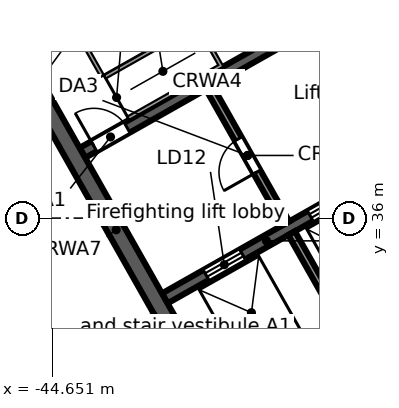
"""IFC4 building model, lengths in metres.
Left out: names, types, materials, properties, quantities, classifications, styles, units other than length and angle.
Written with IfcOpenShell. Run it as: python <this file> out.ifc"""

import sys

from ifc_helpers import new_model, si_unit, direction, frame, frame_2d, origin, place, context, subcontext, project, spatial, rectangle, extrude, element, fill, save


model = new_model("IFC4")
c1 = context("Model", 3, precision=1e-05, world=origin(), true_north=direction((0.0, 1.0)))
c2 = subcontext(c1, "Body", "Model", "MODEL_VIEW")
j1 = project(units=[si_unit("LENGTHUNIT", "METRE"), si_unit("PLANEANGLEUNIT", "RADIAN")], contexts=[c1])
p1 = place(None, origin())
s1 = spatial("IfcSite", under=j1, at=p1, CompositionType="ELEMENT")
p2 = place(p1, origin())
s2 = spatial("IfcBuilding", under=s1, at=p2, CompositionType="ELEMENT")
p3 = place(p2, frame((0.0, 0.0, 219.2)))
s3 = spatial("IfcBuildingStorey", under=s2, at=p3, CompositionType="ELEMENT", Elevation=219.2)
p4 = place(p3, frame((-0.046, 47.974, 0.0), z_axis=(0.0, 0.0, 1.0), x_axis=(-0.870356579543, -0.492421998337, 0.0)))
e1 = element("IfcWall", 1, at=p4, inside=s3, PredefinedType="STANDARD", context=c2, shape_type="SweptSolid", body=[
    extrude(rectangle(XDim=43.754, YDim=0.25, at=frame_2d((21.877, 0.0))), origin(), (0.0, 0.0, 1.0), 3.62),
])
p5 = place(p4, frame((41.061, 0.0, 0.8)))
e2 = element("IfcOpeningElement", 2, at=p5, cuts=e1, PredefinedType="OPENING", context=c2, shape_type="SweptSolid", body=[
    extrude(rectangle(XDim=2.4, YDim=2.2, at=frame_2d((1.2, 1.1))), frame((0.0, 0.135, 0.0), z_axis=(0.0, -1.0, 0.0), x_axis=(1.0, 0.0, 0.0)), (0.0, 0.0, 1.0), 0.27),
])
p6 = place(p4, frame((38.443, 0.0, 0.0)))
e3 = element("IfcOpeningElement", 3, at=p6, cuts=e1, PredefinedType="OPENING", context=c2, shape_type="SweptSolid", body=[
    extrude(rectangle(XDim=1.8, YDim=2.4, at=frame_2d((0.9, 1.2))), frame((0.0, 0.135, 0.0), z_axis=(0.0, -1.0, 0.0), x_axis=(1.0, 0.0, 0.0)), (0.0, 0.0, 1.0), 0.27),
])
p7 = place(p4, frame((35.225, 0.0, 0.8)))
e4 = element("IfcOpeningElement", 4, at=p7, cuts=e1, PredefinedType="OPENING", context=c2, shape_type="SweptSolid", body=[
    extrude(rectangle(XDim=2.4, YDim=2.2, at=frame_2d((1.2, 1.1))), frame((0.0, 0.135, 0.0), z_axis=(0.0, -1.0, 0.0), x_axis=(1.0, 0.0, 0.0)), (0.0, 0.0, 1.0), 0.27),
])
p8 = place(p4, frame((32.307, 0.0, 0.8)))
e5 = element("IfcOpeningElement", 5, at=p8, cuts=e1, PredefinedType="OPENING", context=c2, shape_type="SweptSolid", body=[
    extrude(rectangle(XDim=2.4, YDim=2.2, at=frame_2d((1.2, 1.1))), frame((0.0, 0.135, 0.0), z_axis=(0.0, -1.0, 0.0), x_axis=(1.0, 0.0, 0.0)), (0.0, 0.0, 1.0), 0.27),
])
p9 = place(p4, frame((29.688, 0.0, 0.0)))
e6 = element("IfcOpeningElement", 6, at=p9, cuts=e1, PredefinedType="OPENING", context=c2, shape_type="SweptSolid", body=[
    extrude(rectangle(XDim=1.8, YDim=2.4, at=frame_2d((0.9, 1.2))), frame((0.0, 0.135, 0.0), z_axis=(0.0, -1.0, 0.0), x_axis=(1.0, 0.0, 0.0)), (0.0, 0.0, 1.0), 0.27),
])
p10 = place(p4, frame((26.47, 0.0, 0.8)))
e7 = element("IfcOpeningElement", 7, at=p10, cuts=e1, PredefinedType="OPENING", context=c2, shape_type="SweptSolid", body=[
    extrude(rectangle(XDim=2.4, YDim=2.2, at=frame_2d((1.2, 1.1))), frame((0.0, 0.135, 0.0), z_axis=(0.0, -1.0, 0.0), x_axis=(1.0, 0.0, 0.0)), (0.0, 0.0, 1.0), 0.27),
])
p11 = place(p4, frame((23.552, 0.0, 0.8)))
e8 = element("IfcOpeningElement", 8, at=p11, cuts=e1, PredefinedType="OPENING", context=c2, shape_type="SweptSolid", body=[
    extrude(rectangle(XDim=2.4, YDim=2.2, at=frame_2d((1.2, 1.1))), frame((0.0, 0.135, 0.0), z_axis=(0.0, -1.0, 0.0), x_axis=(1.0, 0.0, 0.0)), (0.0, 0.0, 1.0), 0.27),
])
p12 = place(p4, frame((20.934, 0.0, 0.0)))
e9 = element("IfcOpeningElement", 9, at=p12, cuts=e1, PredefinedType="OPENING", context=c2, shape_type="SweptSolid", body=[
    extrude(rectangle(XDim=1.8, YDim=2.4, at=frame_2d((0.9, 1.2))), frame((0.0, 0.135, 0.0), z_axis=(0.0, -1.0, 0.0), x_axis=(1.0, 0.0, 0.0)), (0.0, 0.0, 1.0), 0.27),
])
p13 = place(p4, frame((17.716, 0.0, 0.8)))
e10 = element("IfcOpeningElement", 10, at=p13, cuts=e1, PredefinedType="OPENING", context=c2, shape_type="SweptSolid", body=[
    extrude(rectangle(XDim=2.4, YDim=2.2, at=frame_2d((1.2, 1.1))), frame((0.0, 0.135, 0.0), z_axis=(0.0, -1.0, 0.0), x_axis=(1.0, 0.0, 0.0)), (0.0, 0.0, 1.0), 0.27),
])
p14 = place(p4, frame((14.798, 0.0, 0.8)))
e11 = element("IfcOpeningElement", 11, at=p14, cuts=e1, PredefinedType="OPENING", context=c2, shape_type="SweptSolid", body=[
    extrude(rectangle(XDim=2.4, YDim=2.2, at=frame_2d((1.2, 1.1))), frame((0.0, 0.135, 0.0), z_axis=(0.0, -1.0, 0.0), x_axis=(1.0, 0.0, 0.0)), (0.0, 0.0, 1.0), 0.27),
])
p15 = place(p4, frame((12.179, 0.0, 0.0)))
e12 = element("IfcOpeningElement", 12, at=p15, cuts=e1, PredefinedType="OPENING", context=c2, shape_type="SweptSolid", body=[
    extrude(rectangle(XDim=1.8, YDim=2.4, at=frame_2d((0.9, 1.2))), frame((0.0, 0.135, 0.0), z_axis=(0.0, -1.0, 0.0), x_axis=(1.0, 0.0, 0.0)), (0.0, 0.0, 1.0), 0.27),
])
p16 = place(p4, frame((8.961, 0.0, 0.8)))
e13 = element("IfcOpeningElement", 13, at=p16, cuts=e1, PredefinedType="OPENING", context=c2, shape_type="SweptSolid", body=[
    extrude(rectangle(XDim=2.4, YDim=2.2, at=frame_2d((1.2, 1.1))), frame((0.0, 0.135, 0.0), z_axis=(0.0, -1.0, 0.0), x_axis=(1.0, 0.0, 0.0)), (0.0, 0.0, 1.0), 0.27),
])
p17 = place(p4, frame((6.043, 0.0, 0.8)))
e14 = element("IfcOpeningElement", 14, at=p17, cuts=e1, PredefinedType="OPENING", context=c2, shape_type="SweptSolid", body=[
    extrude(rectangle(XDim=2.4, YDim=2.2, at=frame_2d((1.2, 1.1))), frame((0.0, 0.135, 0.0), z_axis=(0.0, -1.0, 0.0), x_axis=(1.0, 0.0, 0.0)), (0.0, 0.0, 1.0), 0.27),
])
p18 = place(p4, frame((3.425, 0.0, 0.0)))
e15 = element("IfcOpeningElement", 15, at=p18, cuts=e1, PredefinedType="OPENING", context=c2, shape_type="SweptSolid", body=[
    extrude(rectangle(XDim=1.8, YDim=2.4, at=frame_2d((0.9, 1.2))), frame((0.0, 0.135, 0.0), z_axis=(0.0, -1.0, 0.0), x_axis=(1.0, 0.0, 0.0)), (0.0, 0.0, 1.0), 0.27),
])
p19 = place(p4, frame((0.207, 0.0, 0.8)))
e16 = element("IfcOpeningElement", 16, at=p19, cuts=e1, PredefinedType="OPENING", context=c2, shape_type="SweptSolid", body=[
    extrude(rectangle(XDim=2.4, YDim=2.2, at=frame_2d((1.2, 1.1))), frame((0.0, 0.135, 0.0), z_axis=(0.0, -1.0, 0.0), x_axis=(1.0, 0.0, 0.0)), (0.0, 0.0, 1.0), 0.27),
])
p20 = place(p3, frame((-58.732, 38.771, 0.0), z_axis=(0.0, 0.0, 1.0), x_axis=(0.870354824205, 0.492425100887, 0.0)))
e17 = element("IfcWall", 17, at=p20, inside=s3, PredefinedType="STANDARD", context=c2, shape_type="SweptSolid", body=[
    extrude(rectangle(XDim=64.006, YDim=0.25, at=frame_2d((32.003, 0.0))), origin(), (0.0, 0.0, 1.0), 3.62),
])
p21 = place(p20, frame((61.259, 0.0, 0.8)))
e18 = element("IfcOpeningElement", 18, at=p21, cuts=e17, PredefinedType="OPENING", context=c2, shape_type="SweptSolid", body=[
    extrude(rectangle(XDim=2.4, YDim=2.2, at=frame_2d((1.2, 1.1))), frame((0.0, 0.135, 0.0), z_axis=(0.0, -1.0, 0.0), x_axis=(1.0, 0.0, 0.0)), (0.0, 0.0, 1.0), 0.27),
])
p22 = place(p20, frame((58.216, 0.0, 0.8)))
e19 = element("IfcOpeningElement", 19, at=p22, cuts=e17, PredefinedType="OPENING", context=c2, shape_type="SweptSolid", body=[
    extrude(rectangle(XDim=2.4, YDim=2.2, at=frame_2d((1.2, 1.1))), frame((0.0, 0.135, 0.0), z_axis=(0.0, -1.0, 0.0), x_axis=(1.0, 0.0, 0.0)), (0.0, 0.0, 1.0), 0.27),
])
p23 = place(p20, frame((55.173, 0.0, 0.8)))
e20 = element("IfcOpeningElement", 20, at=p23, cuts=e17, PredefinedType="OPENING", context=c2, shape_type="SweptSolid", body=[
    extrude(rectangle(XDim=2.4, YDim=2.2, at=frame_2d((1.2, 1.1))), frame((0.0, 0.135, 0.0), z_axis=(0.0, -1.0, 0.0), x_axis=(1.0, 0.0, 0.0)), (0.0, 0.0, 1.0), 0.27),
])
p24 = place(p20, frame((52.129, 0.0, 0.8)))
e21 = element("IfcOpeningElement", 21, at=p24, cuts=e17, PredefinedType="OPENING", context=c2, shape_type="SweptSolid", body=[
    extrude(rectangle(XDim=2.4, YDim=2.2, at=frame_2d((1.2, 1.1))), frame((0.0, 0.135, 0.0), z_axis=(0.0, -1.0, 0.0), x_axis=(1.0, 0.0, 0.0)), (0.0, 0.0, 1.0), 0.27),
])
p25 = place(p20, frame((49.086, 0.0, 0.8)))
e22 = element("IfcOpeningElement", 22, at=p25, cuts=e17, PredefinedType="OPENING", context=c2, shape_type="SweptSolid", body=[
    extrude(rectangle(XDim=2.4, YDim=2.2, at=frame_2d((1.2, 1.1))), frame((0.0, 0.135, 0.0), z_axis=(0.0, -1.0, 0.0), x_axis=(1.0, 0.0, 0.0)), (0.0, 0.0, 1.0), 0.27),
])
p26 = place(p20, frame((46.043, 0.0, 0.8)))
e23 = element("IfcOpeningElement", 23, at=p26, cuts=e17, PredefinedType="OPENING", context=c2, shape_type="SweptSolid", body=[
    extrude(rectangle(XDim=2.4, YDim=2.2, at=frame_2d((1.2, 1.1))), frame((0.0, 0.135, 0.0), z_axis=(0.0, -1.0, 0.0), x_axis=(1.0, 0.0, 0.0)), (0.0, 0.0, 1.0), 0.27),
])
p27 = place(p20, frame((43.0, 0.0, 0.8)))
e24 = element("IfcOpeningElement", 24, at=p27, cuts=e17, PredefinedType="OPENING", context=c2, shape_type="SweptSolid", body=[
    extrude(rectangle(XDim=2.4, YDim=2.2, at=frame_2d((1.2, 1.1))), frame((0.0, 0.135, 0.0), z_axis=(0.0, -1.0, 0.0), x_axis=(1.0, 0.0, 0.0)), (0.0, 0.0, 1.0), 0.27),
])
p28 = place(p20, frame((39.956, 0.0, 0.8)))
e25 = element("IfcOpeningElement", 25, at=p28, cuts=e17, PredefinedType="OPENING", context=c2, shape_type="SweptSolid", body=[
    extrude(rectangle(XDim=2.4, YDim=2.2, at=frame_2d((1.2, 1.1))), frame((0.0, 0.135, 0.0), z_axis=(0.0, -1.0, 0.0), x_axis=(1.0, 0.0, 0.0)), (0.0, 0.0, 1.0), 0.27),
])
p29 = place(p20, frame((36.913, 0.0, 0.8)))
e26 = element("IfcOpeningElement", 26, at=p29, cuts=e17, PredefinedType="OPENING", context=c2, shape_type="SweptSolid", body=[
    extrude(rectangle(XDim=2.4, YDim=2.2, at=frame_2d((1.2, 1.1))), frame((0.0, 0.135, 0.0), z_axis=(0.0, -1.0, 0.0), x_axis=(1.0, 0.0, 0.0)), (0.0, 0.0, 1.0), 0.27),
])
p30 = place(p20, frame((33.87, 0.0, 0.8)))
e27 = element("IfcOpeningElement", 27, at=p30, cuts=e17, PredefinedType="OPENING", context=c2, shape_type="SweptSolid", body=[
    extrude(rectangle(XDim=2.4, YDim=2.2, at=frame_2d((1.2, 1.1))), frame((0.0, 0.135, 0.0), z_axis=(0.0, -1.0, 0.0), x_axis=(1.0, 0.0, 0.0)), (0.0, 0.0, 1.0), 0.27),
])
p31 = place(p20, frame((30.826, 0.0, 0.8)))
e28 = element("IfcOpeningElement", 28, at=p31, cuts=e17, PredefinedType="OPENING", context=c2, shape_type="SweptSolid", body=[
    extrude(rectangle(XDim=2.4, YDim=2.2, at=frame_2d((1.2, 1.1))), frame((0.0, 0.135, 0.0), z_axis=(0.0, -1.0, 0.0), x_axis=(1.0, 0.0, 0.0)), (0.0, 0.0, 1.0), 0.27),
])
p32 = place(p20, frame((27.783, 0.0, 0.8)))
e29 = element("IfcOpeningElement", 29, at=p32, cuts=e17, PredefinedType="OPENING", context=c2, shape_type="SweptSolid", body=[
    extrude(rectangle(XDim=2.4, YDim=2.2, at=frame_2d((1.2, 1.1))), frame((0.0, 0.135, 0.0), z_axis=(0.0, -1.0, 0.0), x_axis=(1.0, 0.0, 0.0)), (0.0, 0.0, 1.0), 0.27),
])
p33 = place(p20, frame((24.74, 0.0, 0.8)))
e30 = element("IfcOpeningElement", 30, at=p33, cuts=e17, PredefinedType="OPENING", context=c2, shape_type="SweptSolid", body=[
    extrude(rectangle(XDim=2.4, YDim=2.2, at=frame_2d((1.2, 1.1))), frame((0.0, 0.135, 0.0), z_axis=(0.0, -1.0, 0.0), x_axis=(1.0, 0.0, 0.0)), (0.0, 0.0, 1.0), 0.27),
])
p34 = place(p20, frame((21.696, 0.0, 0.8)))
e31 = element("IfcOpeningElement", 31, at=p34, cuts=e17, PredefinedType="OPENING", context=c2, shape_type="SweptSolid", body=[
    extrude(rectangle(XDim=2.4, YDim=2.2, at=frame_2d((1.2, 1.1))), frame((0.0, 0.135, 0.0), z_axis=(0.0, -1.0, 0.0), x_axis=(1.0, 0.0, 0.0)), (0.0, 0.0, 1.0), 0.27),
])
p35 = place(p20, frame((18.653, 0.0, 0.8)))
e32 = element("IfcOpeningElement", 32, at=p35, cuts=e17, PredefinedType="OPENING", context=c2, shape_type="SweptSolid", body=[
    extrude(rectangle(XDim=2.4, YDim=2.2, at=frame_2d((1.2, 1.1))), frame((0.0, 0.135, 0.0), z_axis=(0.0, -1.0, 0.0), x_axis=(1.0, 0.0, 0.0)), (0.0, 0.0, 1.0), 0.27),
])
p36 = place(p20, frame((15.61, 0.0, 0.8)))
e33 = element("IfcOpeningElement", 33, at=p36, cuts=e17, PredefinedType="OPENING", context=c2, shape_type="SweptSolid", body=[
    extrude(rectangle(XDim=2.4, YDim=2.2, at=frame_2d((1.2, 1.1))), frame((0.0, 0.135, 0.0), z_axis=(0.0, -1.0, 0.0), x_axis=(1.0, 0.0, 0.0)), (0.0, 0.0, 1.0), 0.27),
])
p37 = place(p20, frame((12.567, 0.0, 0.8)))
e34 = element("IfcOpeningElement", 34, at=p37, cuts=e17, PredefinedType="OPENING", context=c2, shape_type="SweptSolid", body=[
    extrude(rectangle(XDim=2.4, YDim=2.2, at=frame_2d((1.2, 1.1))), frame((0.0, 0.135, 0.0), z_axis=(0.0, -1.0, 0.0), x_axis=(1.0, 0.0, 0.0)), (0.0, 0.0, 1.0), 0.27),
])
p38 = place(p20, frame((9.523, 0.0, 0.8)))
e35 = element("IfcOpeningElement", 35, at=p38, cuts=e17, PredefinedType="OPENING", context=c2, shape_type="SweptSolid", body=[
    extrude(rectangle(XDim=2.4, YDim=2.2, at=frame_2d((1.2, 1.1))), frame((0.0, 0.135, 0.0), z_axis=(0.0, -1.0, 0.0), x_axis=(1.0, 0.0, 0.0)), (0.0, 0.0, 1.0), 0.27),
])
p39 = place(p20, frame((6.48, 0.0, 0.8)))
e36 = element("IfcOpeningElement", 36, at=p39, cuts=e17, PredefinedType="OPENING", context=c2, shape_type="SweptSolid", body=[
    extrude(rectangle(XDim=2.4, YDim=2.2, at=frame_2d((1.2, 1.1))), frame((0.0, 0.135, 0.0), z_axis=(0.0, -1.0, 0.0), x_axis=(1.0, 0.0, 0.0)), (0.0, 0.0, 1.0), 0.27),
])
p40 = place(p20, frame((3.437, 0.0, 0.8)))
e37 = element("IfcOpeningElement", 37, at=p40, cuts=e17, PredefinedType="OPENING", context=c2, shape_type="SweptSolid", body=[
    extrude(rectangle(XDim=2.4, YDim=2.2, at=frame_2d((1.2, 1.1))), frame((0.0, 0.135, 0.0), z_axis=(0.0, -1.0, 0.0), x_axis=(1.0, 0.0, 0.0)), (0.0, 0.0, 1.0), 0.27),
])
p41 = place(p20, frame((0.393, 0.0, 0.8)))
e38 = element("IfcOpeningElement", 38, at=p41, cuts=e17, PredefinedType="OPENING", context=c2, shape_type="SweptSolid", body=[
    extrude(rectangle(XDim=2.4, YDim=2.2, at=frame_2d((1.2, 1.1))), frame((0.0, 0.135, 0.0), z_axis=(0.0, -1.0, 0.0), x_axis=(1.0, 0.0, 0.0)), (0.0, 0.0, 1.0), 0.27),
])
p42 = place(p3, frame((-44.115, 26.507, 0.0), z_axis=(0.0, 0.0, 1.0), x_axis=(-0.857166583633, 0.515039268311, 0.0)))
e39 = element("IfcWall", 39, at=p42, inside=s3, PredefinedType="STANDARD", context=c2, shape_type="SweptSolid", body=[
    extrude(rectangle(XDim=17.106, YDim=0.25, at=frame_2d((8.553, 0.0))), origin(), (0.0, 0.0, 1.0), 3.62),
])
p43 = place(p42, frame((14.417, 0.0, 0.8)))
e40 = element("IfcOpeningElement", 40, at=p43, cuts=e39, PredefinedType="OPENING", context=c2, shape_type="SweptSolid", body=[
    extrude(rectangle(XDim=2.4, YDim=2.2, at=frame_2d((1.2, 1.1))), frame((0.0, 0.135, 0.0), z_axis=(0.0, -1.0, 0.0), x_axis=(1.0, 0.0, 0.0)), (0.0, 0.0, 1.0), 0.27),
])
p44 = place(p42, frame((11.584, 0.0, 0.8)))
e41 = element("IfcOpeningElement", 41, at=p44, cuts=e39, PredefinedType="OPENING", context=c2, shape_type="SweptSolid", body=[
    extrude(rectangle(XDim=2.4, YDim=2.2, at=frame_2d((1.2, 1.1))), frame((0.0, 0.135, 0.0), z_axis=(0.0, -1.0, 0.0), x_axis=(1.0, 0.0, 0.0)), (0.0, 0.0, 1.0), 0.27),
])
p45 = place(p42, frame((8.75, 0.0, 0.8)))
e42 = element("IfcOpeningElement", 42, at=p45, cuts=e39, PredefinedType="OPENING", context=c2, shape_type="SweptSolid", body=[
    extrude(rectangle(XDim=2.4, YDim=2.2, at=frame_2d((1.2, 1.1))), frame((0.0, 0.135, 0.0), z_axis=(0.0, -1.0, 0.0), x_axis=(1.0, 0.0, 0.0)), (0.0, 0.0, 1.0), 0.27),
])
p46 = place(p42, frame((5.917, 0.0, 0.8)))
e43 = element("IfcOpeningElement", 43, at=p46, cuts=e39, PredefinedType="OPENING", context=c2, shape_type="SweptSolid", body=[
    extrude(rectangle(XDim=2.4, YDim=2.2, at=frame_2d((1.2, 1.1))), frame((0.0, 0.135, 0.0), z_axis=(0.0, -1.0, 0.0), x_axis=(1.0, 0.0, 0.0)), (0.0, 0.0, 1.0), 0.27),
])
p47 = place(p42, frame((3.084, 0.0, 0.8)))
e44 = element("IfcOpeningElement", 44, at=p47, cuts=e39, PredefinedType="OPENING", context=c2, shape_type="SweptSolid", body=[
    extrude(rectangle(XDim=2.4, YDim=2.2, at=frame_2d((1.2, 1.1))), frame((0.0, 0.135, 0.0), z_axis=(0.0, -1.0, 0.0), x_axis=(1.0, 0.0, 0.0)), (0.0, 0.0, 1.0), 0.27),
])
p48 = place(p42, frame((0.25, 0.0, 0.8)))
e45 = element("IfcOpeningElement", 45, at=p48, cuts=e39, PredefinedType="OPENING", context=c2, shape_type="SweptSolid", body=[
    extrude(rectangle(XDim=2.4, YDim=2.2, at=frame_2d((1.2, 1.1))), frame((0.0, 0.135, 0.0), z_axis=(0.0, -1.0, 0.0), x_axis=(1.0, 0.0, 0.0)), (0.0, 0.0, 1.0), 0.27),
])
p49 = place(p3, frame((-39.825, 29.684, 0.0), z_axis=(0.0, 0.0, 1.0), x_axis=(0.870353598469, 0.492427267353, 0.0)))
e46 = element("IfcWall", 46, at=p49, inside=s3, PredefinedType="SOLIDWALL", context=c2, shape_type="SweptSolid", body=[
    extrude(rectangle(XDim=17.0, YDim=0.45, at=frame_2d((8.5, 0.0))), origin(), (0.0, 0.0, 1.0), 3.62),
])
p50 = place(p49, frame((7.2, 0.0, 0.0)))
e47 = element("IfcOpeningElement", 47, at=p50, cuts=e46, PredefinedType="OPENING", context=c2, shape_type="SweptSolid", body=[
    extrude(rectangle(XDim=1.2, YDim=2.1, at=frame_2d((0.6, 1.05))), frame((0.0, 0.235, 0.0), z_axis=(0.0, -1.0, 0.0), x_axis=(1.0, 0.0, 0.0)), (0.0, 0.0, 1.0), 0.47),
])
p51 = place(p3, frame((-41.687, 33.887, 0.0), z_axis=(0.0, 0.0, 1.0), x_axis=(0.870355736587, 0.49242348826, 0.0)))
e48 = element("IfcWall", 48, at=p51, inside=s3, PredefinedType="SOLIDWALL", context=c2, shape_type="SweptSolid", body=[
    extrude(rectangle(XDim=6.15, YDim=0.3, at=frame_2d((3.075, 0.0))), origin(), (0.0, 0.0, 1.0), 3.62),
])
p52 = place(p51, frame((1.25, 0.0, 0.0)))
e49 = element("IfcOpeningElement", 49, at=p52, cuts=e48, PredefinedType="OPENING", context=c2, shape_type="SweptSolid", body=[
    extrude(rectangle(XDim=1.1, YDim=2.1, at=frame_2d((0.55, 1.05))), frame((0.0, 0.16, 0.0), z_axis=(0.0, -1.0, 0.0), x_axis=(1.0, 0.0, 0.0)), (0.0, 0.0, 1.0), 0.32),
])
p53 = place(p51, frame((4.4, 0.0, 0.0)))
e50 = element("IfcOpeningElement", 50, at=p53, cuts=e48, PredefinedType="OPENING", context=c2, shape_type="SweptSolid", body=[
    extrude(rectangle(XDim=1.1, YDim=2.1, at=frame_2d((0.55, 1.05))), frame((0.0, 0.16, 0.0), z_axis=(0.0, -1.0, 0.0), x_axis=(1.0, 0.0, 0.0)), (0.0, 0.0, 1.0), 0.32),
])
p54 = place(p3, frame((-43.853, 37.717, 0.0), z_axis=(0.0, 0.0, 1.0), x_axis=(0.870360409231, 0.492415229297, 0.0)))
e51 = element("IfcWall", 51, at=p54, inside=s3, PredefinedType="SOLIDWALL", context=c2, shape_type="SweptSolid", body=[
    extrude(rectangle(XDim=7.55, YDim=0.3, at=frame_2d((3.775, 0.0))), origin(), (0.0, 0.0, 1.0), 3.62),
])
p55 = place(p54, frame((0.35, 0.0, 0.0)))
e52 = element("IfcOpeningElement", 52, at=p55, cuts=e51, PredefinedType="OPENING", context=c2, shape_type="SweptSolid", body=[
    extrude(rectangle(XDim=1.0, YDim=2.1, at=frame_2d((0.5, 1.05))), frame((0.0, 0.16, 0.0), z_axis=(0.0, -1.0, 0.0), x_axis=(1.0, 0.0, 0.0)), (0.0, 0.0, 1.0), 0.32),
])
p56 = place(p3, frame((-46.191, 41.392, 0.0), z_axis=(0.0, 0.0, 1.0), x_axis=(0.492421378713, -0.870356930107, 0.0)))
e53 = element("IfcWall", 53, at=p56, inside=s3, PredefinedType="SOLIDWALL", context=c2, shape_type="SweptSolid", body=[
    extrude(rectangle(XDim=13.1, YDim=0.45, at=frame_2d((6.55, 0.0))), origin(), (0.0, 0.0, 1.0), 3.62),
])
p57 = place(p3, frame((-38.349, 35.603, 0.0), z_axis=(0.0, 0.0, 1.0), x_axis=(0.492409653846, -0.870363563575, 0.0)))
e54 = element("IfcWall", 54, at=p57, inside=s3, PredefinedType="SOLIDWALL", context=c2, shape_type="SweptSolid", body=[
    extrude(rectangle(XDim=4.2, YDim=0.2, at=frame_2d((2.1, 0.0))), origin(), (0.0, 0.0, 1.0), 3.62),
])
p58 = place(p3, frame((-40.516, 39.433, 0.0), z_axis=(0.0, 0.0, 1.0), x_axis=(0.492453559952, -0.87033872216, 0.0)))
e55 = element("IfcWall", 55, at=p58, inside=s3, PredefinedType="PARTITIONING", context=c2, shape_type="SweptSolid", body=[
    extrude(rectangle(XDim=4.1, YDim=0.2, at=frame_2d((2.05, 0.0))), origin(), (0.0, 0.0, 1.0), 3.62),
])
p59 = place(p58, frame((1.55, 0.0, 0.0)))
e56 = element("IfcOpeningElement", 56, at=p59, cuts=e55, PredefinedType="OPENING", context=c2, shape_type="SweptSolid", body=[
    extrude(rectangle(XDim=1.0, YDim=2.1, at=frame_2d((0.5, 1.05))), frame((0.0, 0.11, 0.0), z_axis=(0.0, -1.0, 0.0), x_axis=(1.0, 0.0, 0.0)), (0.0, 0.0, 1.0), 0.22),
])
p60 = place(p3, frame((-46.935, 30.573, 0.0), z_axis=(0.0, 0.0, 1.0), x_axis=(0.870367427407, 0.492402824229, 0.0)))
e57 = element("IfcWall", 57, at=p60, inside=s3, PredefinedType="PARTITIONING", context=c2, shape_type="SweptSolid", body=[
    extrude(rectangle(XDim=5.75, YDim=0.125, at=frame_2d((2.875, 0.0))), origin(), (0.0, 0.0, 1.0), 3.62),
])
p61 = place(p60, frame((2.45, 0.0, 0.0)))
e58 = element("IfcOpeningElement", 58, at=p61, cuts=e57, PredefinedType="OPENING", context=c2, shape_type="SweptSolid", body=[
    extrude(rectangle(XDim=0.9, YDim=2.1, at=frame_2d((0.45, 1.05))), frame((0.0, 0.073, 0.0), z_axis=(0.0, -1.0, 0.0), x_axis=(1.0, 0.0, 0.0)), (0.0, 0.0, 1.0), 0.145),
])
p62 = place(p52, origin())
e59 = element("IfcDoor", 59, at=p62, inside=s3, OperationType="DOUBLE_DOOR_SLIDING", PredefinedType="DOOR", context=c2, shape_type="SweptSolid", body=[
    extrude(rectangle(XDim=1.1, YDim=2.1, at=frame_2d((0.55, 1.05))), frame((0.0, 0.025, 0.0), z_axis=(0.0, -1.0, 0.0), x_axis=(1.0, 0.0, 0.0)), (0.0, 0.0, 1.0), 0.05),
])
fill(e49, e59)
p63 = place(p53, origin())
e60 = element("IfcDoor", 60, at=p63, inside=s3, OperationType="DOUBLE_DOOR_SLIDING", PredefinedType="DOOR", context=c2, shape_type="SweptSolid", body=[
    extrude(rectangle(XDim=1.1, YDim=2.1, at=frame_2d((0.55, 1.05))), frame((0.0, 0.025, 0.0), z_axis=(0.0, -1.0, 0.0), x_axis=(1.0, 0.0, 0.0)), (0.0, 0.0, 1.0), 0.05),
])
fill(e50, e60)
p64 = place(p55, origin())
e61 = element("IfcDoor", 61, at=p64, inside=s3, OperationType="SINGLE_SWING_LEFT", PredefinedType="DOOR", context=c2, shape_type="SweptSolid", body=[
    extrude(rectangle(XDim=1.0, YDim=2.1, at=frame_2d((0.5, 1.05))), frame((0.0, 0.025, 0.0), z_axis=(0.0, -1.0, 0.0), x_axis=(1.0, 0.0, 0.0)), (0.0, 0.0, 1.0), 0.05),
])
fill(e52, e61)
p65 = place(p59, frame((1.0, 0.0, 0.0), z_axis=(0.0, 0.0, 1.0), x_axis=(-1.0, 0.0, 0.0)))
e62 = element("IfcDoor", 62, at=p65, inside=s3, OperationType="SINGLE_SWING_LEFT", PredefinedType="DOOR", context=c2, shape_type="SweptSolid", body=[
    extrude(rectangle(XDim=1.0, YDim=2.1, at=frame_2d((0.5, 1.05))), frame((0.0, 0.025, 0.0), z_axis=(0.0, -1.0, 0.0), x_axis=(1.0, 0.0, 0.0)), (0.0, 0.0, 1.0), 0.05),
])
fill(e56, e62)
save(model, sys.argv[1])
